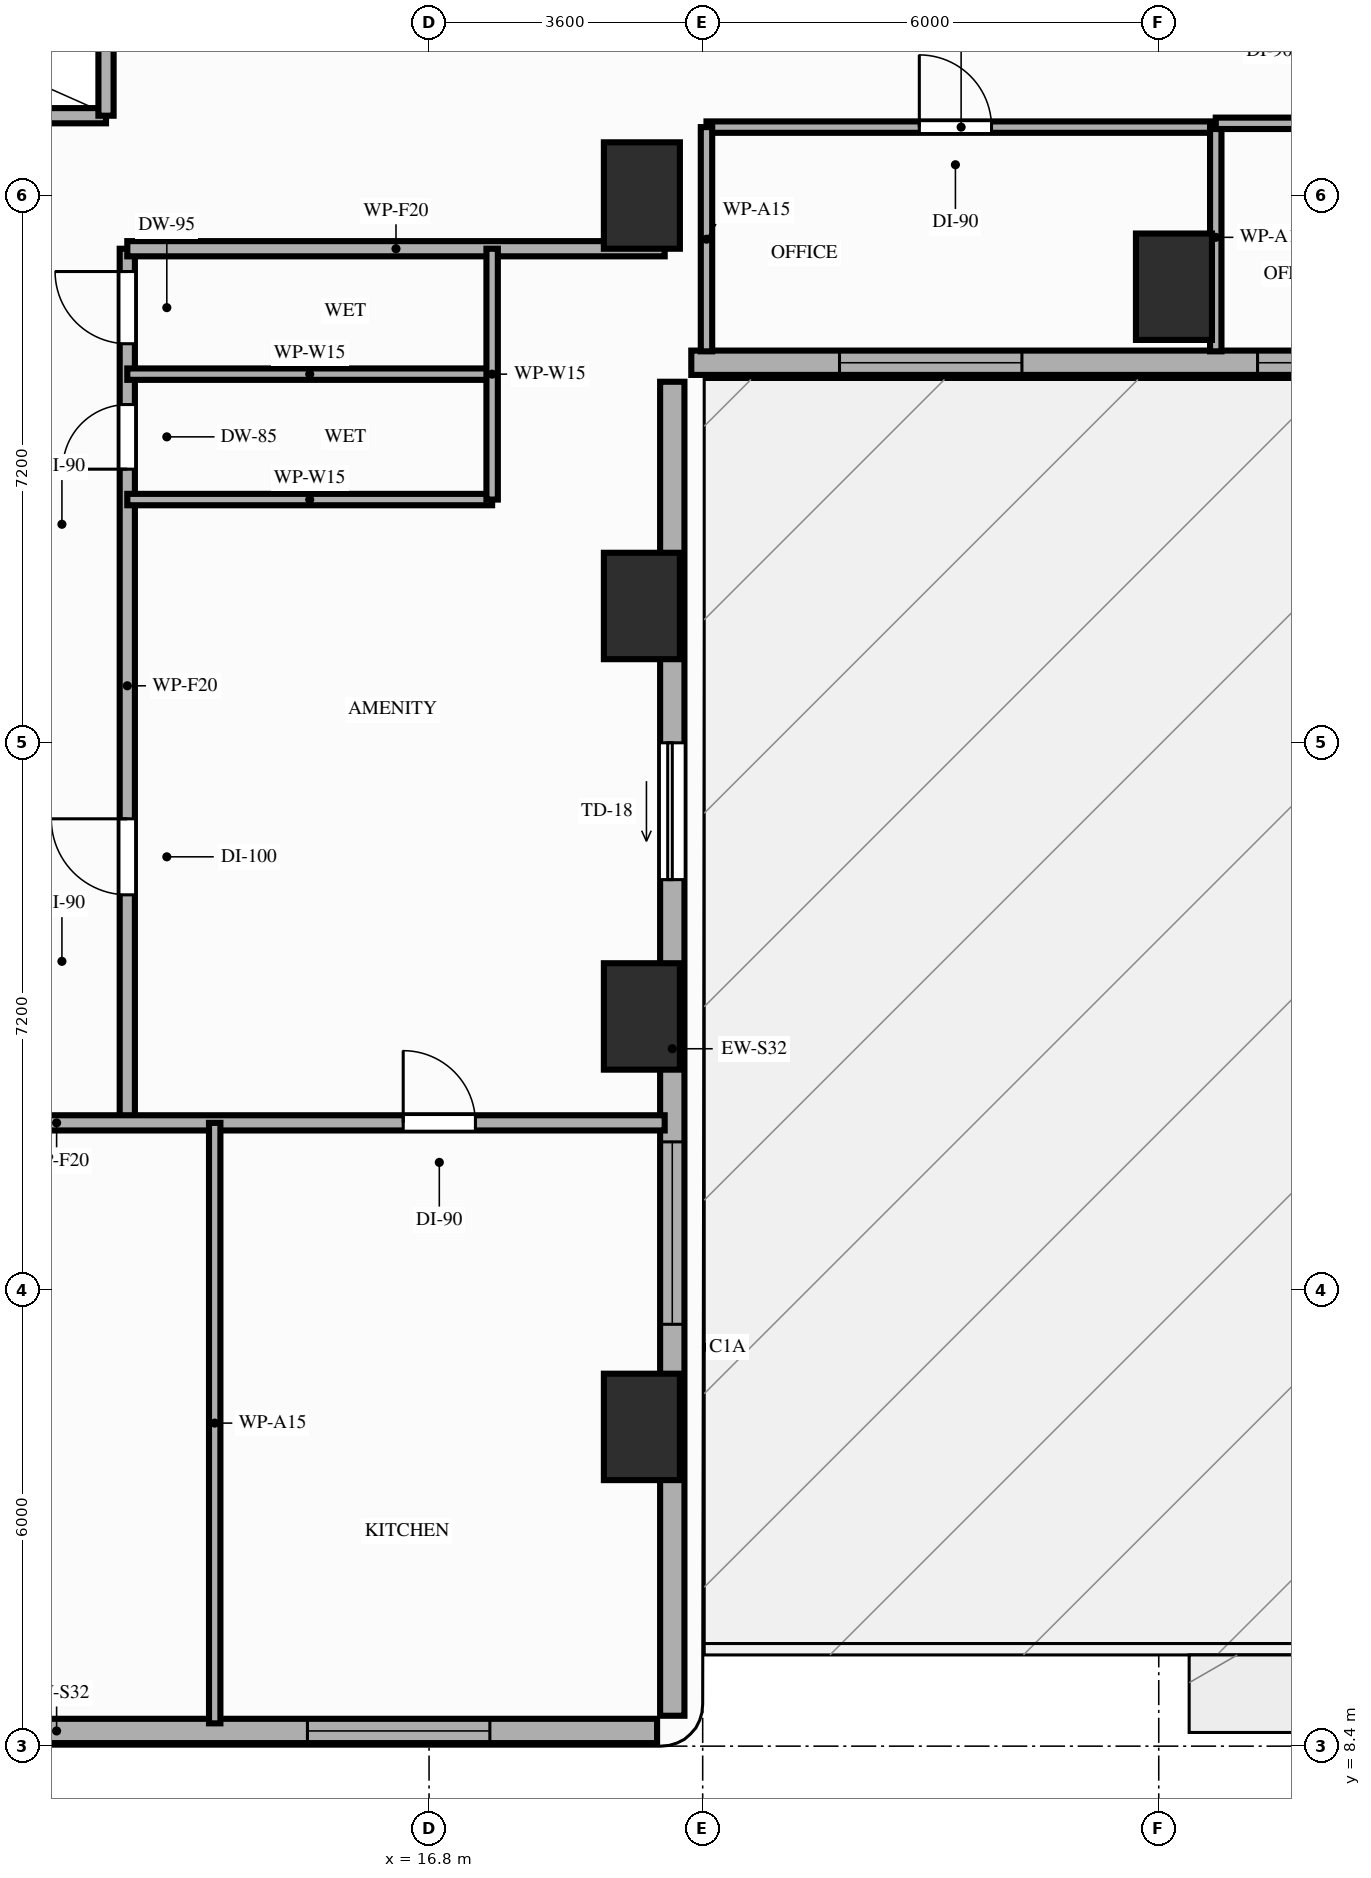
"""IFC4 building model, lengths in metres.
Left out: names, types, materials, properties, quantities, classifications, styles, units other than length and angle.
Written with IfcOpenShell. Run it as: python <this file> out.ifc"""

import sys

from ifc_helpers import new_model, si_unit, direction, frame, frame_2d, origin, origin_2d, place, context, subcontext, project, spatial, rectangle, extrude, element, fill, save


model = new_model("IFC4")
c1 = context("Model", 3, precision=1e-05, world=origin(), true_north=direction((0.0, 1.0)))
c2 = subcontext(c1, "Body", "Model", "MODEL_VIEW")
j1 = project(units=[si_unit("LENGTHUNIT", "METRE"), si_unit("PLANEANGLEUNIT", "RADIAN")], contexts=[c1])
p1 = place(None, origin())
s1 = spatial("IfcSite", under=j1, at=p1, CompositionType="ELEMENT")
p2 = place(p1, origin())
s2 = spatial("IfcBuilding", under=s1, at=p2, CompositionType="ELEMENT")
p3 = place(p2, frame((0.0, 0.0, 26.4)))
s3 = spatial("IfcBuildingStorey", under=s2, at=p3, CompositionType="ELEMENT", Elevation=26.4)
for number, where, z_axis, x_axis in (
    (1, (19.6, 12.6, -0.32), (0.0, 0.0, 1.0), (1.0, 0.0, 0.0)),
    (2, (19.6, 18.0, -0.32), (0.0, 0.0, 1.0), (1.0, 0.0, 0.0)),
    (3, (19.6, 23.4, -0.32), (0.0, 0.0, 1.0), (1.0, 0.0, 0.0)),
    (4, (19.6, 28.8, -0.32), (0.0, 0.0, 1.0), (1.0, 0.0, 0.0)),
    (5, (26.6, 27.6, -0.32), (0.0, 0.0, 1.0), (1.0, 0.0, 0.0)),
):
    element("IfcColumn", number, at=place(p3, frame(where, z_axis=z_axis, x_axis=x_axis)), inside=s3, PredefinedType="COLUMN", context=c2, shape_type="SweptSolid", body=[
        extrude(rectangle(XDim=1.0, YDim=1.4, at=origin_2d()), origin(), (0.0, 0.0, 1.0), 4.12),
    ])
p4 = place(p3, frame((4.0, 8.6, 0.0), z_axis=(0.0, 0.0, 1.0), x_axis=(1.0, 0.0, 0.0)))
e6 = element("IfcWall", 6, at=p4, inside=s3, PredefinedType="STANDARD", context=c2, shape_type="SweptSolid", body=[
    extrude(rectangle(XDim=15.8, YDim=0.32, at=frame_2d((7.9, 0.0))), origin(), (0.0, 0.0, 1.0), 3.62),
])
p5 = place(p4, frame((3.0, 0.0, 0.85)))
e7 = element("IfcOpeningElement", 7, at=p5, cuts=e6, PredefinedType="OPENING", context=c2, shape_type="SweptSolid", body=[
    extrude(rectangle(XDim=2.4, YDim=1.8, at=frame_2d((1.2, 0.9))), frame((0.0, 0.17, 0.0), z_axis=(0.0, -1.0, 0.0), x_axis=(1.0, 0.0, 0.0)), (0.0, 0.0, 1.0), 0.34),
])
p6 = place(p4, frame((11.2, 0.0, 0.85)))
e8 = element("IfcOpeningElement", 8, at=p6, cuts=e6, PredefinedType="OPENING", context=c2, shape_type="SweptSolid", body=[
    extrude(rectangle(XDim=2.4, YDim=1.8, at=frame_2d((1.2, 0.9))), frame((0.0, 0.17, 0.0), z_axis=(0.0, -1.0, 0.0), x_axis=(1.0, 0.0, 0.0)), (0.0, 0.0, 1.0), 0.34),
])
p7 = place(p3, frame((20.0, 8.8, 0.0), z_axis=(0.0, 0.0, 1.0), x_axis=(0.0, 1.0, 0.0)))
e9 = element("IfcWall", 9, at=p7, inside=s3, PredefinedType="STANDARD", context=c2, shape_type="SweptSolid", body=[
    extrude(rectangle(XDim=17.55, YDim=0.32, at=frame_2d((8.775, 0.0))), origin(), (0.0, 0.0, 1.0), 3.0),
])
p8 = place(p7, frame((5.15, 0.0, 0.85)))
e10 = element("IfcOpeningElement", 10, at=p8, cuts=e9, PredefinedType="OPENING", context=c2, shape_type="SweptSolid", body=[
    extrude(rectangle(XDim=2.4, YDim=1.8, at=frame_2d((1.2, 0.9))), frame((0.0, 0.17, 0.0), z_axis=(0.0, -1.0, 0.0), x_axis=(1.0, 0.0, 0.0)), (0.0, 0.0, 1.0), 0.34),
])
p9 = place(p7, frame((11.0, 0.0, 0.0)))
e11 = element("IfcOpeningElement", 11, at=p9, cuts=e9, PredefinedType="OPENING", context=c2, shape_type="SweptSolid", body=[
    extrude(rectangle(XDim=1.8, YDim=2.2, at=frame_2d((0.9, 1.1))), frame((0.0, 0.17, 0.0), z_axis=(0.0, -1.0, 0.0), x_axis=(1.0, 0.0, 0.0)), (0.0, 0.0, 1.0), 0.34),
])
p10 = place(p3, frame((20.25, 26.6, 0.0), z_axis=(0.0, 0.0, 1.0), x_axis=(1.0, 0.0, 0.0)))
e12 = element("IfcWall", 12, at=p10, inside=s3, PredefinedType="STANDARD", context=c2, shape_type="SweptSolid", body=[
    extrude(rectangle(XDim=26.15, YDim=0.32, at=frame_2d((13.075, 0.0))), origin(), (0.0, 0.0, 1.0), 3.62),
])
p11 = place(p10, frame((1.95, 0.0, 0.85)))
e13 = element("IfcOpeningElement", 13, at=p11, cuts=e12, PredefinedType="OPENING", context=c2, shape_type="SweptSolid", body=[
    extrude(rectangle(XDim=2.4, YDim=1.8, at=frame_2d((1.2, 0.9))), frame((0.0, 0.17, 0.0), z_axis=(0.0, -1.0, 0.0), x_axis=(1.0, 0.0, 0.0)), (0.0, 0.0, 1.0), 0.34),
])
p12 = place(p10, frame((7.45, 0.0, 0.85)))
e14 = element("IfcOpeningElement", 14, at=p12, cuts=e12, PredefinedType="OPENING", context=c2, shape_type="SweptSolid", body=[
    extrude(rectangle(XDim=2.4, YDim=1.8, at=frame_2d((1.2, 0.9))), frame((0.0, 0.17, 0.0), z_axis=(0.0, -1.0, 0.0), x_axis=(1.0, 0.0, 0.0)), (0.0, 0.0, 1.0), 0.34),
])
p13 = place(p10, frame((13.35, 0.0, 0.85)))
e15 = element("IfcOpeningElement", 15, at=p13, cuts=e12, PredefinedType="OPENING", context=c2, shape_type="SweptSolid", body=[
    extrude(rectangle(XDim=2.4, YDim=1.8, at=frame_2d((1.2, 0.9))), frame((0.0, 0.17, 0.0), z_axis=(0.0, -1.0, 0.0), x_axis=(1.0, 0.0, 0.0)), (0.0, 0.0, 1.0), 0.34),
])
p14 = place(p10, frame((21.95, 0.0, 0.85)))
e16 = element("IfcOpeningElement", 16, at=p14, cuts=e12, PredefinedType="OPENING", context=c2, shape_type="SweptSolid", body=[
    extrude(rectangle(XDim=2.4, YDim=1.8, at=frame_2d((1.2, 0.9))), frame((0.0, 0.17, 0.0), z_axis=(0.0, -1.0, 0.0), x_axis=(1.0, 0.0, 0.0)), (0.0, 0.0, 1.0), 0.34),
])
p15 = place(p3, frame((7.0, 29.85, 0.0), z_axis=(0.0, 0.0, 1.0), x_axis=(1.0, 0.0, 0.0)))
e17 = element("IfcWall", 17, at=p15, inside=s3, PredefinedType="MOVABLE", context=c2, shape_type="SweptSolid", body=[
    extrude(rectangle(XDim=5.55, YDim=0.2, at=frame_2d((2.775, 0.0))), origin(), (0.0, 0.0, 1.0), 3.62),
])
p16 = place(p3, frame((12.55, 29.85, 0.0), z_axis=(0.0, 0.0, 1.0), x_axis=(0.0, 1.0, 0.0)))
e18 = element("IfcWall", 18, at=p16, inside=s3, PredefinedType="MOVABLE", context=c2, shape_type="SweptSolid", body=[
    extrude(rectangle(XDim=2.5, YDim=0.2, at=frame_2d((1.25, 0.0))), origin(), (0.0, 0.0, 1.0), 3.62),
])
p17 = place(p3, frame((12.83, 16.6, 0.0), z_axis=(0.0, 0.0, 1.0), x_axis=(0.0, 1.0, 0.0)))
e19 = element("IfcWall", 19, at=p17, inside=s3, PredefinedType="PARTITIONING", context=c2, shape_type="SweptSolid", body=[
    extrude(rectangle(XDim=11.5, YDim=0.2, at=frame_2d((5.75, 0.0))), origin(), (0.0, 0.0, 1.0), 3.0),
])
p18 = place(p17, frame((3.0, 0.0, 0.0)))
e20 = element("IfcOpeningElement", 20, at=p18, cuts=e19, PredefinedType="OPENING", context=c2, shape_type="SweptSolid", body=[
    extrude(rectangle(XDim=1.0, YDim=2.15, at=frame_2d((0.5, 1.075))), frame((0.0, 0.11, 0.0), z_axis=(0.0, -1.0, 0.0), x_axis=(1.0, 0.0, 0.0)), (0.0, 0.0, 1.0), 0.22),
])
p19 = place(p17, frame((8.6, 0.0, 0.0)))
e21 = element("IfcOpeningElement", 21, at=p19, cuts=e19, PredefinedType="OPENING", context=c2, shape_type="SweptSolid", body=[
    extrude(rectangle(XDim=0.85, YDim=2.1, at=frame_2d((0.425, 1.05))), frame((0.0, 0.11, 0.0), z_axis=(0.0, -1.0, 0.0), x_axis=(1.0, 0.0, 0.0)), (0.0, 0.0, 1.0), 0.22),
])
p20 = place(p17, frame((10.25, 0.0, 0.0)))
e22 = element("IfcOpeningElement", 22, at=p20, cuts=e19, PredefinedType="OPENING", context=c2, shape_type="SweptSolid", body=[
    extrude(rectangle(XDim=0.95, YDim=2.1, at=frame_2d((0.475, 1.05))), frame((0.0, 0.11, 0.0), z_axis=(0.0, -1.0, 0.0), x_axis=(1.0, 0.0, 0.0)), (0.0, 0.0, 1.0), 0.22),
])
p21 = place(p3, frame((3.9, 16.6, 0.0), z_axis=(0.0, 0.0, 1.0), x_axis=(1.0, 0.0, 0.0)))
e23 = element("IfcWall", 23, at=p21, inside=s3, PredefinedType="PARTITIONING", context=c2, shape_type="SweptSolid", body=[
    extrude(rectangle(XDim=16.0, YDim=0.2, at=frame_2d((8.0, 0.0))), origin(), (0.0, 0.0, 1.0), 3.0),
])
p22 = place(p21, frame((4.56, 0.0, 0.0)))
e24 = element("IfcOpeningElement", 24, at=p22, cuts=e23, PredefinedType="OPENING", context=c2, shape_type="SweptSolid", body=[
    extrude(rectangle(XDim=0.95, YDim=2.15, at=frame_2d((0.475, 1.075))), frame((0.0, 0.11, 0.0), z_axis=(0.0, -1.0, 0.0), x_axis=(1.0, 0.0, 0.0)), (0.0, 0.0, 1.0), 0.22),
])
p23 = place(p21, frame((12.56, 0.0, 0.0)))
e25 = element("IfcOpeningElement", 25, at=p23, cuts=e23, PredefinedType="OPENING", context=c2, shape_type="SweptSolid", body=[
    extrude(rectangle(XDim=0.95, YDim=2.15, at=frame_2d((0.475, 1.075))), frame((0.0, 0.11, 0.0), z_axis=(0.0, -1.0, 0.0), x_axis=(1.0, 0.0, 0.0)), (0.0, 0.0, 1.0), 0.22),
])
p24 = place(p3, frame((12.83, 28.1, 0.0), z_axis=(0.0, 0.0, 1.0), x_axis=(1.0, 0.0, 0.0)))
e26 = element("IfcWall", 26, at=p24, inside=s3, PredefinedType="PARTITIONING", context=c2, shape_type="SweptSolid", body=[
    extrude(rectangle(XDim=7.07, YDim=0.2, at=frame_2d((3.535, 0.0))), origin(), (0.0, 0.0, 1.0), 3.0),
])
p25 = place(p3, frame((20.45, 29.7, 0.0), z_axis=(0.0, 0.0, 1.0), x_axis=(1.0, 0.0, 0.0)))
e27 = element("IfcWall", 27, at=p25, inside=s3, PredefinedType="PARTITIONING", context=c2, shape_type="SweptSolid", body=[
    extrude(rectangle(XDim=6.7, YDim=0.15, at=frame_2d((3.35, 0.0))), origin(), (0.0, 0.0, 1.0), 3.0),
])
p26 = place(p25, frame((2.8, 0.0, 0.0)))
e28 = element("IfcOpeningElement", 28, at=p26, cuts=e27, PredefinedType="OPENING", context=c2, shape_type="SweptSolid", body=[
    extrude(rectangle(XDim=0.95, YDim=2.15, at=frame_2d((0.475, 1.075))), frame((0.0, 0.085, 0.0), z_axis=(0.0, -1.0, 0.0), x_axis=(1.0, 0.0, 0.0)), (0.0, 0.0, 1.0), 0.17),
])
p27 = place(p3, frame((20.45, 26.75, 0.0), z_axis=(0.0, 0.0, 1.0), x_axis=(0.0, 1.0, 0.0)))
e29 = element("IfcWall", 29, at=p27, inside=s3, PredefinedType="PARTITIONING", context=c2, shape_type="SweptSolid", body=[
    extrude(rectangle(XDim=2.95, YDim=0.15, at=frame_2d((1.475, 0.0))), origin(), (0.0, 0.0, 1.0), 3.62),
])
p28 = place(p3, frame((27.15, 26.75, 0.0), z_axis=(0.0, 0.0, 1.0), x_axis=(0.0, 1.0, 0.0)))
e30 = element("IfcWall", 30, at=p28, inside=s3, PredefinedType="PARTITIONING", context=c2, shape_type="SweptSolid", body=[
    extrude(rectangle(XDim=3.0, YDim=0.15, at=frame_2d((1.5, 0.0))), origin(), (0.0, 0.0, 1.0), 3.62),
])
p29 = place(p3, frame((13.98, 8.7, 0.0), z_axis=(0.0, 0.0, 1.0), x_axis=(0.0, 1.0, 0.0)))
e31 = element("IfcWall", 31, at=p29, inside=s3, PredefinedType="PARTITIONING", context=c2, shape_type="SweptSolid", body=[
    extrude(rectangle(XDim=7.9, YDim=0.15, at=frame_2d((3.95, 0.0))), origin(), (0.0, 0.0, 1.0), 3.0),
])
p30 = place(p3, frame((12.83, 24.8, 0.0), z_axis=(0.0, 0.0, 1.0), x_axis=(1.0, 0.0, 0.0)))
e32 = element("IfcWall", 32, at=p30, inside=s3, PredefinedType="PARTITIONING", context=c2, shape_type="SweptSolid", body=[
    extrude(rectangle(XDim=4.8, YDim=0.15, at=frame_2d((2.4, 0.0))), origin(), (0.0, 0.0, 1.0), 3.3),
])
p31 = place(p3, frame((12.83, 26.45, 0.0), z_axis=(0.0, 0.0, 1.0), x_axis=(1.0, 0.0, 0.0)))
e33 = element("IfcWall", 33, at=p31, inside=s3, PredefinedType="PARTITIONING", context=c2, shape_type="SweptSolid", body=[
    extrude(rectangle(XDim=4.8, YDim=0.15, at=frame_2d((2.4, 0.0))), origin(), (0.0, 0.0, 1.0), 3.62),
])
p32 = place(p3, frame((17.63, 24.8, 0.0), z_axis=(0.0, 0.0, 1.0), x_axis=(0.0, 1.0, 0.0)))
e34 = element("IfcWall", 34, at=p32, inside=s3, PredefinedType="PARTITIONING", context=c2, shape_type="SweptSolid", body=[
    extrude(rectangle(XDim=3.3, YDim=0.15, at=frame_2d((1.65, 0.0))), origin(), (0.0, 0.0, 1.0), 3.3),
])
p33 = place(p3, frame((27.15, 29.75, 0.0), z_axis=(0.0, 0.0, 1.0), x_axis=(1.0, 0.0, 0.0)))
e35 = element("IfcWall", 35, at=p33, inside=s3, PredefinedType="PARTITIONING", context=c2, shape_type="SweptSolid", body=[
    extrude(rectangle(XDim=11.15, YDim=0.15, at=frame_2d((5.575, 0.0))), origin(), (0.0, 0.0, 1.0), 3.62),
])
p34 = place(p33, frame((1.59, 0.0, 0.0)))
e36 = element("IfcOpeningElement", 36, at=p34, cuts=e35, PredefinedType="OPENING", context=c2, shape_type="SweptSolid", body=[
    extrude(rectangle(XDim=0.95, YDim=2.15, at=frame_2d((0.475, 1.075))), frame((0.0, 0.085, 0.0), z_axis=(0.0, -1.0, 0.0), x_axis=(1.0, 0.0, 0.0)), (0.0, 0.0, 1.0), 0.17),
])
p35 = place(p33, frame((7.16, 0.0, 0.0)))
e37 = element("IfcOpeningElement", 37, at=p35, cuts=e35, PredefinedType="OPENING", context=c2, shape_type="SweptSolid", body=[
    extrude(rectangle(XDim=0.95, YDim=2.15, at=frame_2d((0.475, 1.075))), frame((0.0, 0.085, 0.0), z_axis=(0.0, -1.0, 0.0), x_axis=(1.0, 0.0, 0.0)), (0.0, 0.0, 1.0), 0.17),
])
p36 = place(p8, origin())
e38 = element("IfcWindow", 38, at=p36, inside=s3, PartitioningType="SINGLE_PANEL", PredefinedType="WINDOW", context=c2, shape_type="SweptSolid", body=[
    extrude(rectangle(XDim=2.4, YDim=1.8, at=frame_2d((1.2, 0.9))), frame((0.0, 0.03, 0.0), z_axis=(0.0, -1.0, 0.0), x_axis=(1.0, 0.0, 0.0)), (0.0, 0.0, 1.0), 0.06),
])
fill(e10, e38)
p37 = place(p6, origin())
e39 = element("IfcWindow", 39, at=p37, inside=s3, PartitioningType="SINGLE_PANEL", PredefinedType="WINDOW", context=c2, shape_type="SweptSolid", body=[
    extrude(rectangle(XDim=2.4, YDim=1.8, at=frame_2d((1.2, 0.9))), frame((0.0, 0.03, 0.0), z_axis=(0.0, -1.0, 0.0), x_axis=(1.0, 0.0, 0.0)), (0.0, 0.0, 1.0), 0.06),
])
fill(e8, e39)
p38 = place(p11, origin())
e40 = element("IfcWindow", 40, at=p38, inside=s3, PartitioningType="SINGLE_PANEL", PredefinedType="WINDOW", context=c2, shape_type="SweptSolid", body=[
    extrude(rectangle(XDim=2.4, YDim=1.8, at=frame_2d((1.2, 0.9))), frame((0.0, 0.03, 0.0), z_axis=(0.0, -1.0, 0.0), x_axis=(1.0, 0.0, 0.0)), (0.0, 0.0, 1.0), 0.06),
])
fill(e13, e40)
p39 = place(p12, origin())
e41 = element("IfcWindow", 41, at=p39, inside=s3, PartitioningType="SINGLE_PANEL", PredefinedType="WINDOW", context=c2, shape_type="SweptSolid", body=[
    extrude(rectangle(XDim=2.4, YDim=1.8, at=frame_2d((1.2, 0.9))), frame((0.0, 0.03, 0.0), z_axis=(0.0, -1.0, 0.0), x_axis=(1.0, 0.0, 0.0)), (0.0, 0.0, 1.0), 0.06),
])
fill(e14, e41)
p40 = place(p9, origin())
e42 = element("IfcDoor", 42, at=p40, inside=s3, OperationType="SLIDING_TO_LEFT", PredefinedType="DOOR", context=c2, shape_type="SweptSolid", body=[
    extrude(rectangle(XDim=1.8, YDim=2.2, at=frame_2d((0.9, 1.1))), frame((0.0, 0.025, 0.0), z_axis=(0.0, -1.0, 0.0), x_axis=(1.0, 0.0, 0.0)), (0.0, 0.0, 1.0), 0.05),
])
fill(e11, e42)
p41 = place(p26, origin())
e43 = element("IfcDoor", 43, at=p41, inside=s3, OperationType="SINGLE_SWING_LEFT", PredefinedType="DOOR", context=c2, shape_type="SweptSolid", body=[
    extrude(rectangle(XDim=0.95, YDim=2.15, at=frame_2d((0.475, 1.075))), frame((0.0, 0.025, 0.0), z_axis=(0.0, -1.0, 0.0), x_axis=(1.0, 0.0, 0.0)), (0.0, 0.0, 1.0), 0.05),
])
fill(e28, e43)
p42 = place(p23, origin())
e44 = element("IfcDoor", 44, at=p42, inside=s3, OperationType="SINGLE_SWING_LEFT", PredefinedType="DOOR", context=c2, shape_type="SweptSolid", body=[
    extrude(rectangle(XDim=0.95, YDim=2.15, at=frame_2d((0.475, 1.075))), frame((0.0, 0.025, 0.0), z_axis=(0.0, -1.0, 0.0), x_axis=(1.0, 0.0, 0.0)), (0.0, 0.0, 1.0), 0.05),
])
fill(e25, e44)
p43 = place(p18, origin())
e45 = element("IfcDoor", 45, at=p43, inside=s3, OperationType="SINGLE_SWING_RIGHT", PredefinedType="DOOR", context=c2, shape_type="SweptSolid", body=[
    extrude(rectangle(XDim=1.0, YDim=2.15, at=frame_2d((0.5, 1.075))), frame((0.0, 0.025, 0.0), z_axis=(0.0, -1.0, 0.0), x_axis=(1.0, 0.0, 0.0)), (0.0, 0.0, 1.0), 0.05),
])
fill(e20, e45)
p44 = place(p19, origin())
e46 = element("IfcDoor", 46, at=p44, inside=s3, OperationType="SINGLE_SWING_LEFT", PredefinedType="DOOR", context=c2, shape_type="SweptSolid", body=[
    extrude(rectangle(XDim=0.85, YDim=2.1, at=frame_2d((0.425, 1.05))), frame((0.0, 0.025, 0.0), z_axis=(0.0, -1.0, 0.0), x_axis=(1.0, 0.0, 0.0)), (0.0, 0.0, 1.0), 0.05),
])
fill(e21, e46)
p45 = place(p20, origin())
e47 = element("IfcDoor", 47, at=p45, inside=s3, OperationType="SINGLE_SWING_RIGHT", PredefinedType="DOOR", context=c2, shape_type="SweptSolid", body=[
    extrude(rectangle(XDim=0.95, YDim=2.1, at=frame_2d((0.475, 1.05))), frame((0.0, 0.025, 0.0), z_axis=(0.0, -1.0, 0.0), x_axis=(1.0, 0.0, 0.0)), (0.0, 0.0, 1.0), 0.05),
])
fill(e22, e47)
save(model, sys.argv[1])
